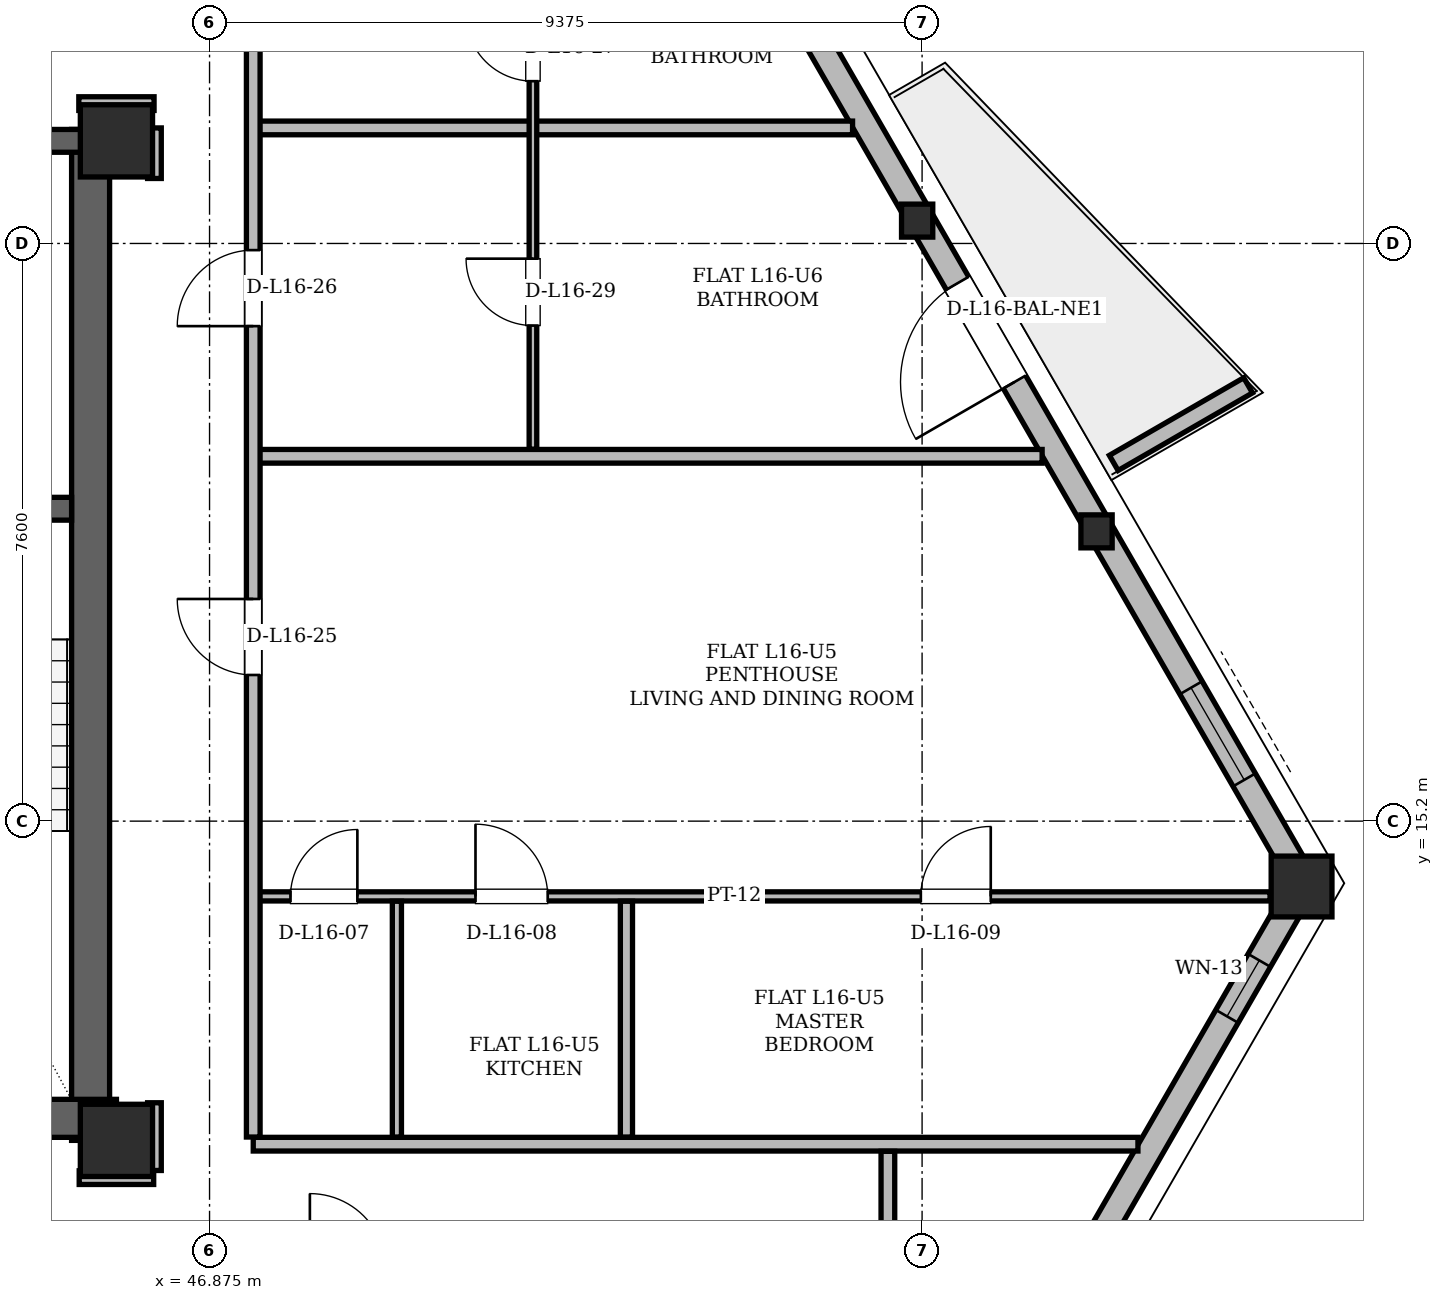
"""IFC4 building model, lengths in metres.
Left out: names, types, materials, properties, quantities, classifications, styles, units other than length and angle.
Written with IfcOpenShell. Run it as: python <this file> out.ifc"""

import sys

from ifc_helpers import new_model, si_unit, direction, frame, frame_2d, origin, origin_2d, place, context, subcontext, project, spatial, polyline, rectangle, hollow_rectangle, i_section, outline, extrude, element, fill, save


model = new_model("IFC4")
c1 = context("Model", 3, precision=1e-05, world=origin(), true_north=direction((0.0, 1.0)))
c2 = subcontext(c1, "Body", "Model", "MODEL_VIEW")
j1 = project(units=[si_unit("LENGTHUNIT", "METRE"), si_unit("PLANEANGLEUNIT", "RADIAN")], contexts=[c1])
p1 = place(None, origin())
s1 = spatial("IfcSite", under=j1, at=p1, CompositionType="ELEMENT")
p2 = place(p1, origin())
s2 = spatial("IfcBuilding", under=s1, at=p2, CompositionType="ELEMENT")
p3 = place(p2, frame((0.0, 0.0, 63.3)))
s3 = spatial("IfcBuildingStorey", under=s2, at=p3, CompositionType="ELEMENT", Elevation=63.3)
for number, where, z_axis, x_axis in (
    (1, (45.65, 11.0, 0.0), (0.0, 0.0, 1.0), (1.0, 0.0, 0.0)),
    (2, (45.65, 24.15, 0.0), (0.0, 0.0, 1.0), (1.0, 0.0, 0.0)),
):
    element("IfcColumn", number, at=place(p3, frame(where, z_axis=z_axis, x_axis=x_axis)), inside=s3, PredefinedType="COLUMN", context=c2, shape_type="SweptSolid", body=[
        extrude(hollow_rectangle(XDim=0.95, YDim=0.95, WallThickness=0.08, at=origin_2d()), origin(), (0.0, 0.0, 1.0), 3.6),
    ])
p4 = place(p3, frame((61.273, 14.383, 0.004), z_axis=(-0.016921115359, -0.023988569163, 0.99956901933), x_axis=(0.817160280721, -0.57641050963, 0.0)))
e3 = element("IfcColumn", 3, at=p4, inside=s3, PredefinedType="COLUMN", context=c2, shape_type="SweptSolid", body=[
    extrude(hollow_rectangle(XDim=0.8, YDim=0.8, WallThickness=0.065, at=origin_2d()), origin(), (0.0, 0.0, 1.0), 3.593),
])
p5 = place(p3, frame((58.579, 19.049, 0.004), z_axis=(-0.01882467693, -0.020591614115, 0.999610732719), x_axis=(0.738063469676, -0.67473129076, 0.0)))
e4 = element("IfcColumn", 4, at=p5, inside=s3, PredefinedType="COLUMN", context=c2, shape_type="SweptSolid", body=[
    extrude(i_section(OverallWidth=0.411, OverallDepth=0.434, WebThickness=0.036, FlangeThickness=0.057, at=origin_2d()), origin(), (0.0, 0.0, 1.0), 3.593),
])
p6 = place(p3, frame((56.222, 23.132, 0.004), z_axis=(-0.020592097484, -0.017533865184, 0.999634197641), x_axis=(0.648304646434, -0.761381038254, 0.0)))
e5 = element("IfcColumn", 5, at=p6, inside=s3, PredefinedType="COLUMN", context=c2, shape_type="SweptSolid", body=[
    extrude(i_section(OverallWidth=0.411, OverallDepth=0.434, WebThickness=0.036, FlangeThickness=0.057, at=origin_2d()), origin(), (0.0, 0.0, 1.0), 3.592),
])
p7 = place(p3, frame((45.31, 11.0, 0.0), z_axis=(0.0, 0.0, 1.0), x_axis=(0.0, 1.0, 0.0)))
e6 = element("IfcWall", 6, at=p7, inside=s3, PredefinedType="SHEAR", context=c2, shape_type="SweptSolid", body=[
    extrude(rectangle(XDim=13.3, YDim=0.5, at=frame_2d((6.65, 0.0))), origin(), (0.0, 0.0, 1.0), 3.36),
])
p8 = place(p3, frame((38.55, 11.29, 0.0), z_axis=(0.0, 0.0, 1.0), x_axis=(1.0, 0.0, 0.0)))
e7 = element("IfcWall", 7, at=p8, inside=s3, PredefinedType="SHEAR", context=c2, shape_type="SweptSolid", body=[
    extrude(rectangle(XDim=7.1, YDim=0.5, at=frame_2d((3.55, 0.0))), origin(), (0.0, 0.0, 1.0), 3.36),
])
p9 = place(p3, frame((29.65, 24.15, 0.0), z_axis=(0.0, 0.0, 1.0), x_axis=(1.0, 0.0, 0.0)))
e8 = element("IfcWall", 8, at=p9, inside=s3, PredefinedType="SHEAR", context=c2, shape_type="SweptSolid", body=[
    extrude(rectangle(XDim=15.7, YDim=0.3, at=frame_2d((7.85, 0.0))), origin(), (0.0, 0.0, 1.0), 3.36),
])
p10 = place(p9, frame((1.7, 0.0, 0.0)))
e9 = element("IfcOpeningElement", 9, at=p10, cuts=e8, PredefinedType="OPENING", context=c2, shape_type="SweptSolid", body=[
    extrude(rectangle(XDim=1.2, YDim=2.2, at=frame_2d((0.6, 1.1))), frame((0.0, 0.15, 0.0), z_axis=(0.0, -1.0, 0.0), x_axis=(1.0, 0.0, 0.0)), (0.0, 0.0, 1.0), 0.3),
])
p11 = place(p9, frame((12.8, 0.0, 0.0)))
e10 = element("IfcOpeningElement", 10, at=p11, cuts=e8, PredefinedType="OPENING", context=c2, shape_type="SweptSolid", body=[
    extrude(rectangle(XDim=1.2, YDim=2.2, at=frame_2d((0.6, 1.1))), frame((0.0, 0.15, 0.0), z_axis=(0.0, -1.0, 0.0), x_axis=(1.0, 0.0, 0.0)), (0.0, 0.0, 1.0), 0.3),
])
p12 = place(p9, frame((6.55, 0.0, 0.0)))
e11 = element("IfcOpeningElement", 11, at=p12, cuts=e8, PredefinedType="OPENING", context=c2, shape_type="SweptSolid", body=[
    extrude(rectangle(XDim=0.9, YDim=2.05, at=frame_2d((0.45, 1.025))), frame((0.0, 0.15, 0.0), z_axis=(0.0, -1.0, 0.0), x_axis=(1.0, 0.0, 0.0)), (0.0, 0.0, 1.0), 0.3),
])
p13 = place(p9, frame((8.45, 0.0, 0.0)))
e12 = element("IfcOpeningElement", 12, at=p13, cuts=e8, PredefinedType="OPENING", context=c2, shape_type="SweptSolid", body=[
    extrude(rectangle(XDim=0.9, YDim=2.05, at=frame_2d((0.45, 1.025))), frame((0.0, 0.15, 0.0), z_axis=(0.0, -1.0, 0.0), x_axis=(1.0, 0.0, 0.0)), (0.0, 0.0, 1.0), 0.3),
])
p14 = place(p3, frame((41.05, 19.31, 0.0), z_axis=(0.0, 0.0, 1.0), x_axis=(1.0, 0.0, 0.0)))
e13 = element("IfcWall", 13, at=p14, inside=s3, PredefinedType="SHEAR", context=c2, shape_type="SweptSolid", body=[
    extrude(rectangle(XDim=4.01, YDim=0.3, at=frame_2d((2.005, 0.0))), origin(), (0.0, 0.0, 1.0), 3.36),
])
p15 = place(p14, frame((1.6, 0.0, 0.0)))
e14 = element("IfcOpeningElement", 14, at=p15, cuts=e13, PredefinedType="OPENING", context=c2, shape_type="SweptSolid", body=[
    extrude(rectangle(XDim=1.4, YDim=2.2, at=frame_2d((0.7, 1.1))), frame((0.0, 0.15, 0.0), z_axis=(0.0, -1.0, 0.0), x_axis=(1.0, 0.0, 0.0)), (0.0, 0.0, 1.0), 0.3),
])
p16 = place(p3, frame((54.337, 2.37, 0.0), z_axis=(0.0, 0.0, 1.0), x_axis=(0.500006336147, 0.866021745577, 0.0)))
e15 = element("IfcWall", 15, at=p16, inside=s3, PredefinedType="SOLIDWALL", context=c2, shape_type="SweptSolid", body=[
    extrude(rectangle(XDim=13.871, YDim=0.34, at=frame_2d((6.936, 0.0))), origin(), (0.0, 0.0, 1.0), 2.494),
])
p17 = place(p16, frame((11.849, 0.0, 1.28)))
e16 = element("IfcOpeningElement", 16, at=p17, cuts=e15, PredefinedType="OPENING", context=c2, shape_type="SweptSolid", body=[
    extrude(rectangle(XDim=0.85, YDim=0.92, at=frame_2d((0.425, 0.46))), frame((0.0, 0.17, 0.0), z_axis=(0.0, -1.0, 0.0), x_axis=(1.0, 0.0, 0.0)), (0.0, 0.0, 1.0), 0.34),
])
p18 = place(p3, frame((61.273, 14.383, 0.0), z_axis=(0.0, 0.0, 1.0), x_axis=(-0.500001933811, 0.866024287295, 0.0)))
e17 = element("IfcWall", 17, at=p18, inside=s3, PredefinedType="SOLIDWALL", context=c2, shape_type="SweptSolid", body=[
    extrude(rectangle(XDim=33.675, YDim=0.34, at=frame_2d((16.837, 0.0))), origin(), (0.0, 0.0, 1.0), 2.494),
])
p19 = place(p18, frame((7.615, 0.0, 0.0)))
e18 = element("IfcOpeningElement", 18, at=p19, cuts=e17, PredefinedType="OPENING", context=c2, shape_type="SweptSolid", body=[
    extrude(rectangle(XDim=1.5, YDim=2.2, at=frame_2d((0.75, 1.1))), frame((0.0, 0.17, 0.0), z_axis=(0.0, -1.0, 0.0), x_axis=(1.0, 0.0, 0.0)), (0.0, 0.0, 1.0), 0.34),
])
p20 = place(p18, frame((25.805, 0.0, 0.0)))
e19 = element("IfcOpeningElement", 19, at=p20, cuts=e17, PredefinedType="OPENING", context=c2, shape_type="SweptSolid", body=[
    extrude(rectangle(XDim=1.5, YDim=2.2, at=frame_2d((0.75, 1.1))), frame((0.0, 0.17, 0.0), z_axis=(0.0, -1.0, 0.0), x_axis=(1.0, 0.0, 0.0)), (0.0, 0.0, 1.0), 0.34),
])
p21 = place(p18, frame((1.57, 0.0, 0.85)))
e20 = element("IfcOpeningElement", 20, at=p21, cuts=e17, PredefinedType="OPENING", context=c2, shape_type="SweptSolid", body=[
    extrude(rectangle(XDim=1.4, YDim=1.534, at=frame_2d((0.7, 0.767))), frame((0.0, 0.17, 0.0), z_axis=(0.0, -1.0, 0.0), x_axis=(1.0, 0.0, 0.0)), (0.0, 0.0, 1.0), 0.34),
])
p22 = place(p18, frame((20.436, 0.0, 0.85)))
e21 = element("IfcOpeningElement", 21, at=p22, cuts=e17, PredefinedType="OPENING", context=c2, shape_type="SweptSolid", body=[
    extrude(rectangle(XDim=1.2, YDim=1.48, at=frame_2d((0.6, 0.74))), frame((0.0, 0.17, 0.0), z_axis=(0.0, -1.0, 0.0), x_axis=(1.0, 0.0, 0.0)), (0.0, 0.0, 1.0), 0.34),
])
p23 = place(p18, frame((29.61, 0.0, 0.85)))
e22 = element("IfcOpeningElement", 22, at=p23, cuts=e17, PredefinedType="OPENING", context=c2, shape_type="SweptSolid", body=[
    extrude(rectangle(XDim=2.2, YDim=1.534, at=frame_2d((1.1, 0.767))), frame((0.0, 0.17, 0.0), z_axis=(0.0, -1.0, 0.0), x_axis=(1.0, 0.0, 0.0)), (0.0, 0.0, 1.0), 0.34),
])
p24 = place(p18, frame((15.013, 0.0, 0.85)))
e23 = element("IfcOpeningElement", 23, at=p24, cuts=e17, PredefinedType="OPENING", context=c2, shape_type="SweptSolid", body=[
    extrude(rectangle(XDim=1.2, YDim=1.48, at=frame_2d((0.6, 0.74))), frame((0.0, 0.17, 0.0), z_axis=(0.0, -1.0, 0.0), x_axis=(1.0, 0.0, 0.0)), (0.0, 0.0, 1.0), 0.34),
])
p25 = place(p18, frame((17.765, 0.0, 0.85)))
e24 = element("IfcOpeningElement", 24, at=p25, cuts=e17, PredefinedType="OPENING", context=c2, shape_type="SweptSolid", body=[
    extrude(rectangle(XDim=1.2, YDim=1.48, at=frame_2d((0.6, 0.74))), frame((0.0, 0.17, 0.0), z_axis=(0.0, -1.0, 0.0), x_axis=(1.0, 0.0, 0.0)), (0.0, 0.0, 1.0), 0.34),
])
p26 = place(p3, frame((58.771, 19.913, 0.0), z_axis=(0.0, 0.0, 1.0), x_axis=(0.866042246008, 0.499970827278, 0.0)))
e25 = element("IfcWall", 25, at=p26, inside=s3, PredefinedType="PARAPET", context=c2, shape_type="SweptSolid", body=[
    extrude(outline(polyline([(0.0, 0.0), (2.042, 0.0), (2.042, 1.1), (0.0, 1.32), (0.0, 0.0)])), frame((0.0, 0.115, 0.0), z_axis=(0.0, -1.0, 0.0), x_axis=(1.0, 0.0, 0.0)), (0.0, 0.0, 1.0), 0.23),
])
p27 = place(p3, frame((45.16, 10.51, 0.0), z_axis=(0.0, 0.0, 1.0), x_axis=(1.0, 0.0, 0.0)))
e26 = element("IfcWall", 26, at=p27, inside=s3, PredefinedType="PARTITIONING", context=c2, shape_type="SweptSolid", body=[
    extrude(rectangle(XDim=0.98, YDim=0.18, at=frame_2d((0.49, 0.0))), origin(), (0.0, 0.0, 1.0), 2.738),
])
p28 = place(p3, frame((47.45, 10.95, 0.0), z_axis=(0.0, 0.0, 1.0), x_axis=(1.0, 0.0, 0.0)))
e27 = element("IfcWall", 27, at=p28, inside=s3, PredefinedType="PARTITIONING", context=c2, shape_type="SweptSolid", body=[
    extrude(rectangle(XDim=11.64, YDim=0.18, at=frame_2d((5.82, 0.0))), origin(), (0.0, 0.0, 1.0), 3.36),
])
p29 = place(p3, frame((47.4, 14.21, 0.0), z_axis=(0.0, 0.0, 1.0), x_axis=(1.0, 0.0, 0.0)))
e28 = element("IfcWall", 28, at=p29, inside=s3, PredefinedType="PARTITIONING", context=c2, shape_type="SweptSolid", body=[
    extrude(rectangle(XDim=13.428, YDim=0.12, at=frame_2d((6.714, 0.0))), origin(), (0.0, 0.0, 1.0), 2.738),
])
p30 = place(p29, frame((0.54, 0.0, 0.0)))
e29 = element("IfcOpeningElement", 29, at=p30, cuts=e28, PredefinedType="OPENING", context=c2, shape_type="SweptSolid", body=[
    extrude(rectangle(XDim=0.88, YDim=2.08, at=frame_2d((0.44, 1.04))), frame((0.0, 0.06, 0.0), z_axis=(0.0, -1.0, 0.0), x_axis=(1.0, 0.0, 0.0)), (0.0, 0.0, 1.0), 0.12),
])
p31 = place(p29, frame((2.974, 0.0, 0.0)))
e30 = element("IfcOpeningElement", 30, at=p31, cuts=e28, PredefinedType="OPENING", context=c2, shape_type="SweptSolid", body=[
    extrude(rectangle(XDim=0.95, YDim=2.1, at=frame_2d((0.475, 1.05))), frame((0.0, 0.06, 0.0), z_axis=(0.0, -1.0, 0.0), x_axis=(1.0, 0.0, 0.0)), (0.0, 0.0, 1.0), 0.12),
])
p32 = place(p29, frame((8.833, 0.0, 0.0)))
e31 = element("IfcOpeningElement", 31, at=p32, cuts=e28, PredefinedType="OPENING", context=c2, shape_type="SweptSolid", body=[
    extrude(rectangle(XDim=0.92, YDim=2.12, at=frame_2d((0.46, 1.06))), frame((0.0, 0.06, 0.0), z_axis=(0.0, -1.0, 0.0), x_axis=(1.0, 0.0, 0.0)), (0.0, 0.0, 1.0), 0.12),
])
p33 = place(p3, frame((47.45, 20.0, 0.0), z_axis=(0.0, 0.0, 1.0), x_axis=(1.0, 0.0, 0.0)))
e32 = element("IfcWall", 32, at=p33, inside=s3, PredefinedType="PARTITIONING", context=c2, shape_type="SweptSolid", body=[
    extrude(rectangle(XDim=10.379, YDim=0.18, at=frame_2d((5.19, 0.0))), origin(), (0.0, 0.0, 1.0), 3.36),
])
p34 = place(p3, frame((47.45, 24.32, 0.0), z_axis=(0.0, 0.0, 1.0), x_axis=(1.0, 0.0, 0.0)))
e33 = element("IfcWall", 33, at=p34, inside=s3, PredefinedType="PARTITIONING", context=c2, shape_type="SweptSolid", body=[
    extrude(rectangle(XDim=7.885, YDim=0.18, at=frame_2d((3.943, 0.0))), origin(), (0.0, 0.0, 1.0), 3.36),
])
p35 = place(p3, frame((45.155, 24.64, 0.0), z_axis=(0.0, 0.0, 1.0), x_axis=(1.0, 0.0, 0.0)))
e34 = element("IfcWall", 34, at=p35, inside=s3, PredefinedType="PARTITIONING", context=c2, shape_type="SweptSolid", body=[
    extrude(rectangle(XDim=0.99, YDim=0.18, at=frame_2d((0.495, 0.0))), origin(), (0.0, 0.0, 1.0), 2.738),
])
p36 = place(p3, frame((46.15, 10.604, 0.0), z_axis=(0.0, 0.0, 1.0), x_axis=(0.0, 1.0, 0.0)))
e35 = element("IfcWall", 35, at=p36, inside=s3, PredefinedType="PARTITIONING", context=c2, shape_type="SweptSolid", body=[
    extrude(rectangle(XDim=0.891, YDim=0.18, at=frame_2d((0.446, 0.0))), origin(), (0.0, 0.0, 1.0), 2.738),
])
p37 = place(p3, frame((46.15, 23.655, 0.0), z_axis=(0.0, 0.0, 1.0), x_axis=(0.0, 1.0, 0.0)))
e36 = element("IfcWall", 36, at=p37, inside=s3, PredefinedType="PARTITIONING", context=c2, shape_type="SweptSolid", body=[
    extrude(rectangle(XDim=0.665, YDim=0.18, at=frame_2d((0.333, 0.0))), origin(), (0.0, 0.0, 1.0), 2.946),
])
p38 = place(p3, frame((47.45, 11.044, 0.0), z_axis=(0.0, 0.0, 1.0), x_axis=(0.0, 1.0, 0.0)))
e37 = element("IfcWall", 37, at=p38, inside=s3, PredefinedType="PARTITIONING", context=c2, shape_type="SweptSolid", body=[
    extrude(rectangle(XDim=14.832, YDim=0.18, at=frame_2d((7.416, 0.0))), origin(), (0.0, 0.0, 1.0), 2.738),
])
p39 = place(p38, frame((6.079, 0.0, 0.0)))
e38 = element("IfcOpeningElement", 38, at=p39, cuts=e37, PredefinedType="OPENING", context=c2, shape_type="SweptSolid", body=[
    extrude(rectangle(XDim=1.0, YDim=2.18, at=frame_2d((0.5, 1.09))), frame((0.0, 0.09, 0.0), z_axis=(0.0, -1.0, 0.0), x_axis=(1.0, 0.0, 0.0)), (0.0, 0.0, 1.0), 0.18),
])
p40 = place(p38, frame((10.668, 0.0, 0.0)))
e39 = element("IfcOpeningElement", 39, at=p40, cuts=e37, PredefinedType="OPENING", context=c2, shape_type="SweptSolid", body=[
    extrude(rectangle(XDim=1.0, YDim=2.18, at=frame_2d((0.5, 1.09))), frame((0.0, 0.09, 0.0), z_axis=(0.0, -1.0, 0.0), x_axis=(1.0, 0.0, 0.0)), (0.0, 0.0, 1.0), 0.18),
])
p41 = place(p3, frame((49.34, 11.044, 0.0), z_axis=(0.0, 0.0, 1.0), x_axis=(0.0, 1.0, 0.0)))
e40 = element("IfcWall", 40, at=p41, inside=s3, PredefinedType="PARTITIONING", context=c2, shape_type="SweptSolid", body=[
    extrude(rectangle(XDim=3.102, YDim=0.12, at=frame_2d((1.551, 0.0))), origin(), (0.0, 0.0, 1.0), 2.738),
])
p42 = place(p3, frame((51.13, 20.094, 0.0), z_axis=(0.0, 0.0, 1.0), x_axis=(0.0, 1.0, 0.0)))
e41 = element("IfcWall", 41, at=p42, inside=s3, PredefinedType="PARTITIONING", context=c2, shape_type="SweptSolid", body=[
    extrude(rectangle(XDim=11.51, YDim=0.1, at=frame_2d((5.755, 0.0))), origin(), (0.0, 0.0, 1.0), 2.494),
])
p43 = place(p42, frame((4.841, 0.0, 0.0)))
e42 = element("IfcOpeningElement", 42, at=p43, cuts=e41, PredefinedType="OPENING", context=c2, shape_type="SweptSolid", body=[
    extrude(rectangle(XDim=0.88, YDim=2.08, at=frame_2d((0.44, 1.04))), frame((0.0, 0.05, 0.0), z_axis=(0.0, -1.0, 0.0), x_axis=(1.0, 0.0, 0.0)), (0.0, 0.0, 1.0), 0.1),
])
p44 = place(p42, frame((8.5, 0.0, 0.0)))
e43 = element("IfcOpeningElement", 43, at=p44, cuts=e41, PredefinedType="OPENING", context=c2, shape_type="SweptSolid", body=[
    extrude(rectangle(XDim=0.95, YDim=2.1, at=frame_2d((0.475, 1.05))), frame((0.0, 0.05, 0.0), z_axis=(0.0, -1.0, 0.0), x_axis=(1.0, 0.0, 0.0)), (0.0, 0.0, 1.0), 0.1),
])
p45 = place(p42, frame((1.626, 0.0, 0.0)))
e44 = element("IfcOpeningElement", 44, at=p45, cuts=e41, PredefinedType="OPENING", context=c2, shape_type="SweptSolid", body=[
    extrude(rectangle(XDim=0.88, YDim=2.08, at=frame_2d((0.44, 1.04))), frame((0.0, 0.05, 0.0), z_axis=(0.0, -1.0, 0.0), x_axis=(1.0, 0.0, 0.0)), (0.0, 0.0, 1.0), 0.1),
])
p46 = place(p3, frame((52.36, 11.044, 0.0), z_axis=(0.0, 0.0, 1.0), x_axis=(0.0, 1.0, 0.0)))
e45 = element("IfcWall", 45, at=p46, inside=s3, PredefinedType="PARTITIONING", context=c2, shape_type="SweptSolid", body=[
    extrude(rectangle(XDim=3.102, YDim=0.16, at=frame_2d((1.551, 0.0))), origin(), (0.0, 0.0, 1.0), 2.738),
])
p47 = place(p3, frame((55.8, 9.394, 0.0), z_axis=(0.0, 0.0, 1.0), x_axis=(0.0, 1.0, 0.0)))
e46 = element("IfcWall", 46, at=p47, inside=s3, PredefinedType="PARTITIONING", context=c2, shape_type="SweptSolid", body=[
    extrude(rectangle(XDim=1.462, YDim=0.18, at=frame_2d((0.731, 0.0))), origin(), (0.0, 0.0, 1.0), 3.36),
])
p48 = place(p19, origin())
e47 = element("IfcDoor", 47, at=p48, inside=s3, OperationType="SINGLE_SWING_LEFT", PredefinedType="DOOR", context=c2, shape_type="SweptSolid", body=[
    extrude(rectangle(XDim=1.5, YDim=2.2, at=frame_2d((0.75, 1.1))), frame((0.0, 0.025, 0.0), z_axis=(0.0, -1.0, 0.0), x_axis=(1.0, 0.0, 0.0)), (0.0, 0.0, 1.0), 0.05),
])
fill(e18, e47)
p49 = place(p21, origin())
e48 = element("IfcWindow", 48, at=p49, inside=s3, PartitioningType="SINGLE_PANEL", PredefinedType="WINDOW", context=c2, shape_type="SweptSolid", body=[
    extrude(rectangle(XDim=1.4, YDim=1.534, at=frame_2d((0.7, 0.767))), frame((0.0, 0.03, 0.0), z_axis=(0.0, -1.0, 0.0), x_axis=(1.0, 0.0, 0.0)), (0.0, 0.0, 1.0), 0.06),
])
fill(e20, e48)
p50 = place(p17, origin())
e49 = element("IfcWindow", 49, at=p50, inside=s3, PartitioningType="SINGLE_PANEL", PredefinedType="WINDOW", context=c2, shape_type="SweptSolid", body=[
    extrude(rectangle(XDim=0.85, YDim=0.92, at=frame_2d((0.425, 0.46))), frame((0.0, 0.03, 0.0), z_axis=(0.0, -1.0, 0.0), x_axis=(1.0, 0.0, 0.0)), (0.0, 0.0, 1.0), 0.06),
])
fill(e16, e49)
p51 = place(p30, origin())
e50 = element("IfcDoor", 50, at=p51, inside=s3, OperationType="SINGLE_SWING_RIGHT", PredefinedType="DOOR", context=c2, shape_type="SweptSolid", body=[
    extrude(rectangle(XDim=0.88, YDim=2.08, at=frame_2d((0.44, 1.04))), frame((0.0, 0.025, 0.0), z_axis=(0.0, -1.0, 0.0), x_axis=(1.0, 0.0, 0.0)), (0.0, 0.0, 1.0), 0.05),
])
fill(e29, e50)
p52 = place(p31, origin())
e51 = element("IfcDoor", 51, at=p52, inside=s3, OperationType="SINGLE_SWING_LEFT", PredefinedType="DOOR", context=c2, shape_type="SweptSolid", body=[
    extrude(rectangle(XDim=0.95, YDim=2.1, at=frame_2d((0.475, 1.05))), frame((0.0, 0.025, 0.0), z_axis=(0.0, -1.0, 0.0), x_axis=(1.0, 0.0, 0.0)), (0.0, 0.0, 1.0), 0.05),
])
fill(e30, e51)
p53 = place(p32, origin())
e52 = element("IfcDoor", 52, at=p53, inside=s3, OperationType="SINGLE_SWING_RIGHT", PredefinedType="DOOR", context=c2, shape_type="SweptSolid", body=[
    extrude(rectangle(XDim=0.92, YDim=2.12, at=frame_2d((0.46, 1.06))), frame((0.0, 0.025, 0.0), z_axis=(0.0, -1.0, 0.0), x_axis=(1.0, 0.0, 0.0)), (0.0, 0.0, 1.0), 0.05),
])
fill(e31, e52)
p54 = place(p39, origin())
e53 = element("IfcDoor", 53, at=p54, inside=s3, OperationType="SINGLE_SWING_RIGHT", PredefinedType="DOOR", context=c2, shape_type="SweptSolid", body=[
    extrude(rectangle(XDim=1.0, YDim=2.18, at=frame_2d((0.5, 1.09))), frame((0.0, 0.025, 0.0), z_axis=(0.0, -1.0, 0.0), x_axis=(1.0, 0.0, 0.0)), (0.0, 0.0, 1.0), 0.05),
])
fill(e38, e53)
p55 = place(p40, origin())
e54 = element("IfcDoor", 54, at=p55, inside=s3, OperationType="SINGLE_SWING_LEFT", PredefinedType="DOOR", context=c2, shape_type="SweptSolid", body=[
    extrude(rectangle(XDim=1.0, YDim=2.18, at=frame_2d((0.5, 1.09))), frame((0.0, 0.025, 0.0), z_axis=(0.0, -1.0, 0.0), x_axis=(1.0, 0.0, 0.0)), (0.0, 0.0, 1.0), 0.05),
])
fill(e39, e54)
p56 = place(p43, origin())
e55 = element("IfcDoor", 55, at=p56, inside=s3, OperationType="SINGLE_SWING_RIGHT", PredefinedType="DOOR", context=c2, shape_type="SweptSolid", body=[
    extrude(rectangle(XDim=0.88, YDim=2.08, at=frame_2d((0.44, 1.04))), frame((0.0, 0.025, 0.0), z_axis=(0.0, -1.0, 0.0), x_axis=(1.0, 0.0, 0.0)), (0.0, 0.0, 1.0), 0.05),
])
fill(e42, e55)
p57 = place(p45, origin())
e56 = element("IfcDoor", 56, at=p57, inside=s3, OperationType="SINGLE_SWING_RIGHT", PredefinedType="DOOR", context=c2, shape_type="SweptSolid", body=[
    extrude(rectangle(XDim=0.88, YDim=2.08, at=frame_2d((0.44, 1.04))), frame((0.0, 0.025, 0.0), z_axis=(0.0, -1.0, 0.0), x_axis=(1.0, 0.0, 0.0)), (0.0, 0.0, 1.0), 0.05),
])
fill(e44, e56)
save(model, sys.argv[1])
